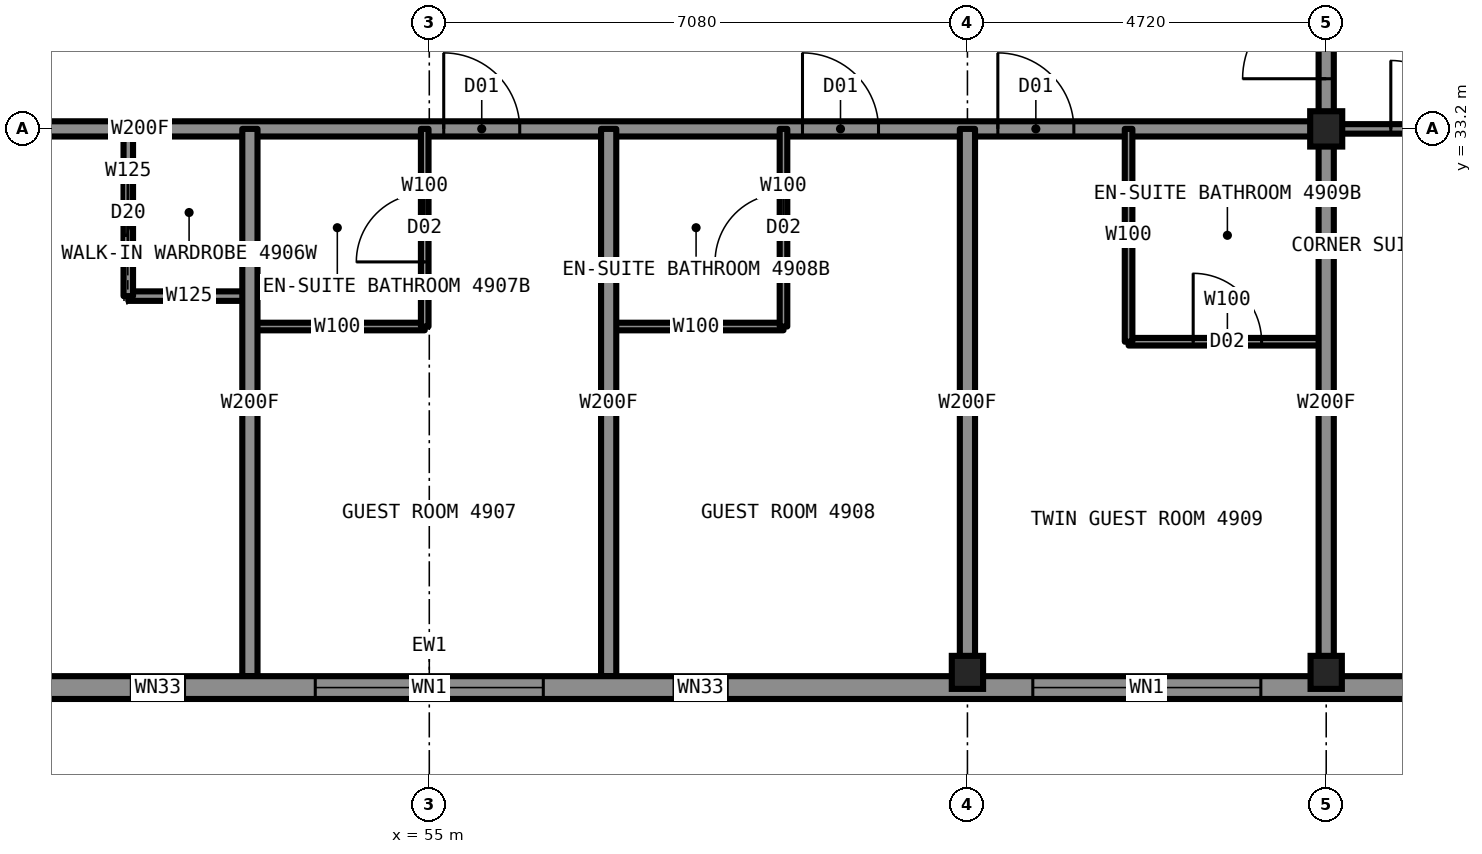
"""IFC4 building model, lengths in metres.
Left out: names, types, materials, properties, quantities, classifications, styles, units other than length and angle.
Written with IfcOpenShell. Run it as: python <this file> out.ifc"""

import sys

from ifc_helpers import new_model, si_unit, direction, frame, frame_2d, origin, origin_2d, place, context, subcontext, project, spatial, rectangle, i_section, extrude, element, fill, save


model = new_model("IFC4")
c1 = context("Model", 3, precision=1e-05, world=origin(), true_north=direction((0.0, 1.0)))
c2 = subcontext(c1, "Body", "Model", "MODEL_VIEW")
j1 = project(units=[si_unit("LENGTHUNIT", "METRE"), si_unit("PLANEANGLEUNIT", "RADIAN")], contexts=[c1])
p1 = place(None, origin())
s1 = spatial("IfcSite", under=j1, at=p1, CompositionType="ELEMENT")
p2 = place(p1, origin())
s2 = spatial("IfcBuilding", under=s1, at=p2, CompositionType="ELEMENT")
p3 = place(p2, frame((0.0, 0.0, 182.8)))
s3 = spatial("IfcBuildingStorey", under=s2, at=p3, CompositionType="ELEMENT", Elevation=182.8)
for number, where, z_axis, x_axis in (
    (1, (62.08, 26.05, 0.0), (0.0, 0.0, 1.0), (1.0, 0.0, 0.0)),
    (2, (66.8, 26.05, 0.0), (0.0, 0.0, 1.0), (1.0, 0.0, 0.0)),
):
    element("IfcColumn", number, at=place(p3, frame(where, z_axis=z_axis, x_axis=x_axis)), inside=s3, PredefinedType="COLUMN", context=c2, shape_type="SweptSolid", body=[
        extrude(i_section(OverallWidth=0.411, OverallDepth=0.434, WebThickness=0.036, FlangeThickness=0.057, at=origin_2d()), origin(), (0.0, 0.0, 1.0), 3.5),
    ])
p4 = place(p3, frame((66.8, 33.2, 0.0), z_axis=(0.0, 0.0, 1.0), x_axis=(1.0, 0.0, 0.0)))
e3 = element("IfcColumn", 3, at=p4, inside=s3, PredefinedType="COLUMN", context=c2, shape_type="SweptSolid", body=[
    extrude(i_section(OverallWidth=0.422, OverallDepth=0.465, WebThickness=0.045, FlangeThickness=0.073, at=origin_2d()), origin(), (0.0, 0.0, 1.0), 3.5),
])
p5 = place(p3, frame((43.2, 33.2, 0.0), z_axis=(0.0, 0.0, 1.0), x_axis=(1.0, 0.0, 0.0)))
e4 = element("IfcWall", 4, at=p5, inside=s3, PredefinedType="PARTITIONING", context=c2, shape_type="SweptSolid", body=[
    extrude(rectangle(XDim=23.6, YDim=0.2, at=frame_2d((11.8, 0.0))), origin(), (0.0, 0.0, 1.0), 3.33),
])
p6 = place(p5, frame((3.0, 0.0, 0.0)))
e5 = element("IfcOpeningElement", 5, at=p6, cuts=e4, PredefinedType="OPENING", context=c2, shape_type="SweptSolid", body=[
    extrude(rectangle(XDim=1.0, YDim=2.2, at=frame_2d((0.5, 1.1))), frame((0.0, 0.11, 0.0), z_axis=(0.0, -1.0, 0.0), x_axis=(1.0, 0.0, 0.0)), (0.0, 0.0, 1.0), 0.22),
])
p7 = place(p5, frame((11.99, 0.0, 0.0)))
e6 = element("IfcOpeningElement", 6, at=p7, cuts=e4, PredefinedType="OPENING", context=c2, shape_type="SweptSolid", body=[
    extrude(rectangle(XDim=1.0, YDim=2.2, at=frame_2d((0.5, 1.1))), frame((0.0, 0.11, 0.0), z_axis=(0.0, -1.0, 0.0), x_axis=(1.0, 0.0, 0.0)), (0.0, 0.0, 1.0), 0.22),
])
p8 = place(p5, frame((16.71, 0.0, 0.0)))
e7 = element("IfcOpeningElement", 7, at=p8, cuts=e4, PredefinedType="OPENING", context=c2, shape_type="SweptSolid", body=[
    extrude(rectangle(XDim=1.0, YDim=2.2, at=frame_2d((0.5, 1.1))), frame((0.0, 0.11, 0.0), z_axis=(0.0, -1.0, 0.0), x_axis=(1.0, 0.0, 0.0)), (0.0, 0.0, 1.0), 0.22),
])
p9 = place(p5, frame((19.28, 0.0, 0.0)))
e8 = element("IfcOpeningElement", 8, at=p9, cuts=e4, PredefinedType="OPENING", context=c2, shape_type="SweptSolid", body=[
    extrude(rectangle(XDim=1.0, YDim=2.2, at=frame_2d((0.5, 1.1))), frame((0.0, 0.11, 0.0), z_axis=(0.0, -1.0, 0.0), x_axis=(1.0, 0.0, 0.0)), (0.0, 0.0, 1.0), 0.22),
])
p10 = place(p3, frame((66.8, 33.2, 0.0), z_axis=(0.0, 0.0, 1.0), x_axis=(1.0, 0.0, 0.0)))
e9 = element("IfcWall", 9, at=p10, inside=s3, PredefinedType="PARTITIONING", context=c2, shape_type="SweptSolid", body=[
    extrude(rectangle(XDim=7.2, YDim=0.125, at=frame_2d((3.6, 0.0))), origin(), (0.0, 0.0, 1.0), 2.573),
])
p11 = place(p10, frame((0.85, 0.0, 0.0)))
e10 = element("IfcOpeningElement", 10, at=p11, cuts=e9, PredefinedType="OPENING", context=c2, shape_type="SweptSolid", body=[
    extrude(rectangle(XDim=0.9, YDim=2.2, at=frame_2d((0.45, 1.1))), frame((0.0, 0.073, 0.0), z_axis=(0.0, -1.0, 0.0), x_axis=(1.0, 0.0, 0.0)), (0.0, 0.0, 1.0), 0.145),
])
p12 = place(p3, frame((51.04, 31.0, 0.0), z_axis=(0.0, 0.0, 1.0), x_axis=(1.0, 0.0, 0.0)))
e11 = element("IfcWall", 11, at=p12, inside=s3, PredefinedType="PARTITIONING", context=c2, shape_type="SweptSolid", body=[
    extrude(rectangle(XDim=1.6, YDim=0.125, at=frame_2d((0.8, 0.0))), origin(), (0.0, 0.0, 1.0), 3.33),
])
p13 = place(p3, frame((52.64, 30.6, 0.0), z_axis=(0.0, 0.0, 1.0), x_axis=(1.0, 0.0, 0.0)))
e12 = element("IfcWall", 12, at=p13, inside=s3, PredefinedType="PARTITIONING", context=c2, shape_type="SweptSolid", body=[
    extrude(rectangle(XDim=2.3, YDim=0.1, at=frame_2d((1.15, 0.0))), origin(), (0.0, 0.0, 1.0), 3.33),
])
p14 = place(p3, frame((57.36, 30.6, 0.0), z_axis=(0.0, 0.0, 1.0), x_axis=(1.0, 0.0, 0.0)))
e13 = element("IfcWall", 13, at=p14, inside=s3, PredefinedType="PARTITIONING", context=c2, shape_type="SweptSolid", body=[
    extrude(rectangle(XDim=2.3, YDim=0.1, at=frame_2d((1.15, 0.0))), origin(), (0.0, 0.0, 1.0), 3.33),
])
p15 = place(p3, frame((64.2, 30.4, 0.0), z_axis=(0.0, 0.0, 1.0), x_axis=(1.0, 0.0, 0.0)))
e14 = element("IfcWall", 14, at=p15, inside=s3, PredefinedType="PARTITIONING", context=c2, shape_type="SweptSolid", body=[
    extrude(rectangle(XDim=2.6, YDim=0.1, at=frame_2d((1.3, 0.0))), origin(), (0.0, 0.0, 1.0), 3.33),
])
p16 = place(p15, frame((0.85, 0.0, 0.0)))
e15 = element("IfcOpeningElement", 15, at=p16, cuts=e14, PredefinedType="OPENING", context=c2, shape_type="SweptSolid", body=[
    extrude(rectangle(XDim=0.9, YDim=2.1, at=frame_2d((0.45, 1.05))), frame((0.0, 0.06, 0.0), z_axis=(0.0, -1.0, 0.0), x_axis=(1.0, 0.0, 0.0)), (0.0, 0.0, 1.0), 0.12),
])
p17 = place(p3, frame((54.94, 30.6, 0.0), z_axis=(0.0, 0.0, 1.0), x_axis=(0.0, 1.0, 0.0)))
e16 = element("IfcWall", 16, at=p17, inside=s3, PredefinedType="PARTITIONING", context=c2, shape_type="SweptSolid", body=[
    extrude(rectangle(XDim=2.6, YDim=0.1, at=frame_2d((1.3, 0.0))), origin(), (0.0, 0.0, 1.0), 2.573),
])
p18 = place(p17, frame((0.85, 0.0, 0.0)))
e17 = element("IfcOpeningElement", 17, at=p18, cuts=e16, PredefinedType="OPENING", context=c2, shape_type="SweptSolid", body=[
    extrude(rectangle(XDim=0.9, YDim=2.1, at=frame_2d((0.45, 1.05))), frame((0.0, 0.06, 0.0), z_axis=(0.0, -1.0, 0.0), x_axis=(1.0, 0.0, 0.0)), (0.0, 0.0, 1.0), 0.12),
])
p19 = place(p3, frame((52.64, 26.0, 0.0), z_axis=(0.0, 0.0, 1.0), x_axis=(0.0, 1.0, 0.0)))
e18 = element("IfcWall", 18, at=p19, inside=s3, PredefinedType="PARTITIONING", context=c2, shape_type="SweptSolid", body=[
    extrude(rectangle(XDim=7.2, YDim=0.2, at=frame_2d((3.6, 0.0))), origin(), (0.0, 0.0, 1.0), 3.33),
])
p20 = place(p3, frame((51.04, 31.0, 0.0), z_axis=(0.0, 0.0, 1.0), x_axis=(0.0, 1.0, 0.0)))
e19 = element("IfcWall", 19, at=p20, inside=s3, PredefinedType="PARTITIONING", context=c2, shape_type="SweptSolid", body=[
    extrude(rectangle(XDim=2.2, YDim=0.125, at=frame_2d((1.1, 0.0))), origin(), (0.0, 0.0, 1.0), 3.33),
])
p21 = place(p20, frame((0.7, 0.0, 0.0)))
e20 = element("IfcOpeningElement", 20, at=p21, cuts=e19, PredefinedType="OPENING", context=c2, shape_type="SweptSolid", body=[
    extrude(rectangle(XDim=0.8, YDim=2.1, at=frame_2d((0.4, 1.05))), frame((0.0, 0.073, 0.0), z_axis=(0.0, -1.0, 0.0), x_axis=(1.0, 0.0, 0.0)), (0.0, 0.0, 1.0), 0.145),
])
p22 = place(p3, frame((66.8, 33.2, 0.0), z_axis=(0.0, 0.0, 1.0), x_axis=(0.0, 1.0, 0.0)))
e21 = element("IfcWall", 21, at=p22, inside=s3, PredefinedType="PARTITIONING", context=c2, shape_type="SweptSolid", body=[
    extrude(rectangle(XDim=4.72, YDim=0.2, at=frame_2d((2.36, 0.0))), origin(), (0.0, 0.0, 1.0), 3.33),
])
p23 = place(p22, frame((0.66, 0.0, 0.0)))
e22 = element("IfcOpeningElement", 22, at=p23, cuts=e21, PredefinedType="OPENING", context=c2, shape_type="SweptSolid", body=[
    extrude(rectangle(XDim=1.1, YDim=2.2, at=frame_2d((0.55, 1.1))), frame((0.0, 0.11, 0.0), z_axis=(0.0, -1.0, 0.0), x_axis=(1.0, 0.0, 0.0)), (0.0, 0.0, 1.0), 0.22),
])
p24 = place(p3, frame((66.8, 26.0, 0.0), z_axis=(0.0, 0.0, 1.0), x_axis=(0.0, 1.0, 0.0)))
e23 = element("IfcWall", 23, at=p24, inside=s3, PredefinedType="PARTITIONING", context=c2, shape_type="SweptSolid", body=[
    extrude(rectangle(XDim=7.2, YDim=0.2, at=frame_2d((3.6, 0.0))), origin(), (0.0, 0.0, 1.0), 2.573),
])
p25 = place(p3, frame((57.36, 26.0, 0.0), z_axis=(0.0, 0.0, 1.0), x_axis=(0.0, 1.0, 0.0)))
e24 = element("IfcWall", 24, at=p25, inside=s3, PredefinedType="PARTITIONING", context=c2, shape_type="SweptSolid", body=[
    extrude(rectangle(XDim=7.2, YDim=0.2, at=frame_2d((3.6, 0.0))), origin(), (0.0, 0.0, 1.0), 3.33),
])
p26 = place(p3, frame((59.66, 30.6, 0.0), z_axis=(0.0, 0.0, 1.0), x_axis=(0.0, 1.0, 0.0)))
e25 = element("IfcWall", 25, at=p26, inside=s3, PredefinedType="PARTITIONING", context=c2, shape_type="SweptSolid", body=[
    extrude(rectangle(XDim=2.6, YDim=0.1, at=frame_2d((1.3, 0.0))), origin(), (0.0, 0.0, 1.0), 3.33),
])
p27 = place(p26, frame((0.85, 0.0, 0.0)))
e26 = element("IfcOpeningElement", 26, at=p27, cuts=e25, PredefinedType="OPENING", context=c2, shape_type="SweptSolid", body=[
    extrude(rectangle(XDim=0.9, YDim=2.1, at=frame_2d((0.45, 1.05))), frame((0.0, 0.06, 0.0), z_axis=(0.0, -1.0, 0.0), x_axis=(1.0, 0.0, 0.0)), (0.0, 0.0, 1.0), 0.12),
])
p28 = place(p3, frame((62.08, 26.0, 0.0), z_axis=(0.0, 0.0, 1.0), x_axis=(0.0, 1.0, 0.0)))
e27 = element("IfcWall", 27, at=p28, inside=s3, PredefinedType="PARTITIONING", context=c2, shape_type="SweptSolid", body=[
    extrude(rectangle(XDim=7.2, YDim=0.2, at=frame_2d((3.6, 0.0))), origin(), (0.0, 0.0, 1.0), 2.573),
])
p29 = place(p3, frame((64.2, 30.4, 0.0), z_axis=(0.0, 0.0, 1.0), x_axis=(0.0, 1.0, 0.0)))
e28 = element("IfcWall", 28, at=p29, inside=s3, PredefinedType="PARTITIONING", context=c2, shape_type="SweptSolid", body=[
    extrude(rectangle(XDim=2.8, YDim=0.1, at=frame_2d((1.4, 0.0))), origin(), (0.0, 0.0, 1.0), 3.33),
])
p30 = place(p3, frame((41.2, 25.85, 0.0), z_axis=(0.0, 0.0, 1.0), x_axis=(1.0, 0.0, 0.0)))
e29 = element("IfcWall", 29, at=p30, inside=s3, PredefinedType="SOLIDWALL", context=c2, shape_type="SweptSolid", body=[
    extrude(rectangle(XDim=27.6, YDim=0.3, at=frame_2d((13.8, 0.0))), origin(), (0.0, 0.0, 1.0), 2.83),
])
p31 = place(p30, frame((2.86, 0.0, 0.3)))
e30 = element("IfcOpeningElement", 30, at=p31, cuts=e29, PredefinedType="OPENING", context=c2, shape_type="SweptSolid", body=[
    extrude(rectangle(XDim=3.0, YDim=2.0, at=frame_2d((1.5, 1.0))), frame((0.0, 0.16, 0.0), z_axis=(0.0, -1.0, 0.0), x_axis=(1.0, 0.0, 0.0)), (0.0, 0.0, 1.0), 0.32),
])
p32 = place(p30, frame((9.88, 0.0, 0.3)))
e31 = element("IfcOpeningElement", 31, at=p32, cuts=e29, PredefinedType="OPENING", context=c2, shape_type="SweptSolid", body=[
    extrude(rectangle(XDim=0.7, YDim=1.1, at=frame_2d((0.35, 0.55))), frame((0.0, 0.16, 0.0), z_axis=(0.0, -1.0, 0.0), x_axis=(1.0, 0.0, 0.0)), (0.0, 0.0, 1.0), 0.32),
])
p33 = place(p30, frame((12.3, 0.0, 0.3)))
e32 = element("IfcOpeningElement", 32, at=p33, cuts=e29, PredefinedType="OPENING", context=c2, shape_type="SweptSolid", body=[
    extrude(rectangle(XDim=3.0, YDim=2.0, at=frame_2d((1.5, 1.0))), frame((0.0, 0.16, 0.0), z_axis=(0.0, -1.0, 0.0), x_axis=(1.0, 0.0, 0.0)), (0.0, 0.0, 1.0), 0.32),
])
p34 = place(p30, frame((17.02, 0.0, 0.3)))
e33 = element("IfcOpeningElement", 33, at=p34, cuts=e29, PredefinedType="OPENING", context=c2, shape_type="SweptSolid", body=[
    extrude(rectangle(XDim=0.7, YDim=1.1, at=frame_2d((0.35, 0.55))), frame((0.0, 0.16, 0.0), z_axis=(0.0, -1.0, 0.0), x_axis=(1.0, 0.0, 0.0)), (0.0, 0.0, 1.0), 0.32),
])
p35 = place(p30, frame((21.74, 0.0, 0.3)))
e34 = element("IfcOpeningElement", 34, at=p35, cuts=e29, PredefinedType="OPENING", context=c2, shape_type="SweptSolid", body=[
    extrude(rectangle(XDim=3.0, YDim=2.0, at=frame_2d((1.5, 1.0))), frame((0.0, 0.16, 0.0), z_axis=(0.0, -1.0, 0.0), x_axis=(1.0, 0.0, 0.0)), (0.0, 0.0, 1.0), 0.32),
])
p36 = place(p21, origin())
e35 = element("IfcDoor", 35, at=p36, inside=s3, OperationType="SLIDING_TO_LEFT", PredefinedType="DOOR", context=c2, shape_type="SweptSolid", body=[
    extrude(rectangle(XDim=0.8, YDim=2.1, at=frame_2d((0.4, 1.05))), frame((0.0, 0.025, 0.0), z_axis=(0.0, -1.0, 0.0), x_axis=(1.0, 0.0, 0.0)), (0.0, 0.0, 1.0), 0.05),
])
fill(e20, e35)
p37 = place(p7, origin())
e36 = element("IfcDoor", 36, at=p37, inside=s3, OperationType="SINGLE_SWING_LEFT", PredefinedType="DOOR", context=c2, shape_type="SweptSolid", body=[
    extrude(rectangle(XDim=1.0, YDim=2.2, at=frame_2d((0.5, 1.1))), frame((0.0, 0.025, 0.0), z_axis=(0.0, -1.0, 0.0), x_axis=(1.0, 0.0, 0.0)), (0.0, 0.0, 1.0), 0.05),
])
fill(e6, e36)
p38 = place(p18, origin())
e37 = element("IfcDoor", 37, at=p38, inside=s3, OperationType="SINGLE_SWING_RIGHT", PredefinedType="DOOR", context=c2, shape_type="SweptSolid", body=[
    extrude(rectangle(XDim=0.9, YDim=2.1, at=frame_2d((0.45, 1.05))), frame((0.0, 0.025, 0.0), z_axis=(0.0, -1.0, 0.0), x_axis=(1.0, 0.0, 0.0)), (0.0, 0.0, 1.0), 0.05),
])
fill(e17, e37)
p39 = place(p8, origin())
e38 = element("IfcDoor", 38, at=p39, inside=s3, OperationType="SINGLE_SWING_LEFT", PredefinedType="DOOR", context=c2, shape_type="SweptSolid", body=[
    extrude(rectangle(XDim=1.0, YDim=2.2, at=frame_2d((0.5, 1.1))), frame((0.0, 0.025, 0.0), z_axis=(0.0, -1.0, 0.0), x_axis=(1.0, 0.0, 0.0)), (0.0, 0.0, 1.0), 0.05),
])
fill(e7, e38)
p40 = place(p27, origin())
e39 = element("IfcDoor", 39, at=p40, inside=s3, OperationType="SINGLE_SWING_RIGHT", PredefinedType="DOOR", context=c2, shape_type="SweptSolid", body=[
    extrude(rectangle(XDim=0.9, YDim=2.1, at=frame_2d((0.45, 1.05))), frame((0.0, 0.025, 0.0), z_axis=(0.0, -1.0, 0.0), x_axis=(1.0, 0.0, 0.0)), (0.0, 0.0, 1.0), 0.05),
])
fill(e26, e39)
p41 = place(p9, origin())
e40 = element("IfcDoor", 40, at=p41, inside=s3, OperationType="SINGLE_SWING_LEFT", PredefinedType="DOOR", context=c2, shape_type="SweptSolid", body=[
    extrude(rectangle(XDim=1.0, YDim=2.2, at=frame_2d((0.5, 1.1))), frame((0.0, 0.025, 0.0), z_axis=(0.0, -1.0, 0.0), x_axis=(1.0, 0.0, 0.0)), (0.0, 0.0, 1.0), 0.05),
])
fill(e8, e40)
p42 = place(p16, origin())
e41 = element("IfcDoor", 41, at=p42, inside=s3, OperationType="SINGLE_SWING_RIGHT", PredefinedType="DOOR", context=c2, shape_type="SweptSolid", body=[
    extrude(rectangle(XDim=0.9, YDim=2.1, at=frame_2d((0.45, 1.05))), frame((0.0, 0.025, 0.0), z_axis=(0.0, -1.0, 0.0), x_axis=(1.0, 0.0, 0.0)), (0.0, 0.0, 1.0), 0.05),
])
fill(e15, e41)
p43 = place(p11, origin())
e42 = element("IfcDoor", 42, at=p43, inside=s3, OperationType="SINGLE_SWING_LEFT", PredefinedType="DOOR", context=c2, shape_type="SweptSolid", body=[
    extrude(rectangle(XDim=0.9, YDim=2.2, at=frame_2d((0.45, 1.1))), frame((0.0, 0.025, 0.0), z_axis=(0.0, -1.0, 0.0), x_axis=(1.0, 0.0, 0.0)), (0.0, 0.0, 1.0), 0.05),
])
fill(e10, e42)
p44 = place(p23, origin())
e43 = element("IfcDoor", 43, at=p44, inside=s3, OperationType="SINGLE_SWING_LEFT", PredefinedType="DOOR", context=c2, shape_type="SweptSolid", body=[
    extrude(rectangle(XDim=1.1, YDim=2.2, at=frame_2d((0.55, 1.1))), frame((0.0, 0.025, 0.0), z_axis=(0.0, -1.0, 0.0), x_axis=(1.0, 0.0, 0.0)), (0.0, 0.0, 1.0), 0.05),
])
fill(e22, e43)
p45 = place(p32, origin())
e44 = element("IfcWindow", 44, at=p45, inside=s3, PartitioningType="SINGLE_PANEL", PredefinedType="WINDOW", context=c2, shape_type="SweptSolid", body=[
    extrude(rectangle(XDim=0.7, YDim=1.1, at=frame_2d((0.35, 0.55))), frame((0.0, 0.13, 0.0), z_axis=(0.0, -1.0, 0.0), x_axis=(1.0, 0.0, 0.0)), (0.0, 0.0, 1.0), 0.06),
])
fill(e31, e44)
p46 = place(p33, origin())
e45 = element("IfcWindow", 45, at=p46, inside=s3, PartitioningType="SINGLE_PANEL", PredefinedType="WINDOW", context=c2, shape_type="SweptSolid", body=[
    extrude(rectangle(XDim=3.0, YDim=2.0, at=frame_2d((1.5, 1.0))), frame((0.0, 0.13, 0.0), z_axis=(0.0, -1.0, 0.0), x_axis=(1.0, 0.0, 0.0)), (0.0, 0.0, 1.0), 0.06),
])
fill(e32, e45)
p47 = place(p34, origin())
e46 = element("IfcWindow", 46, at=p47, inside=s3, PartitioningType="SINGLE_PANEL", PredefinedType="WINDOW", context=c2, shape_type="SweptSolid", body=[
    extrude(rectangle(XDim=0.7, YDim=1.1, at=frame_2d((0.35, 0.55))), frame((0.0, 0.13, 0.0), z_axis=(0.0, -1.0, 0.0), x_axis=(1.0, 0.0, 0.0)), (0.0, 0.0, 1.0), 0.06),
])
fill(e33, e46)
p48 = place(p35, origin())
e47 = element("IfcWindow", 47, at=p48, inside=s3, PartitioningType="SINGLE_PANEL", PredefinedType="WINDOW", context=c2, shape_type="SweptSolid", body=[
    extrude(rectangle(XDim=3.0, YDim=2.0, at=frame_2d((1.5, 1.0))), frame((0.0, 0.13, 0.0), z_axis=(0.0, -1.0, 0.0), x_axis=(1.0, 0.0, 0.0)), (0.0, 0.0, 1.0), 0.06),
])
fill(e34, e47)
save(model, sys.argv[1])
